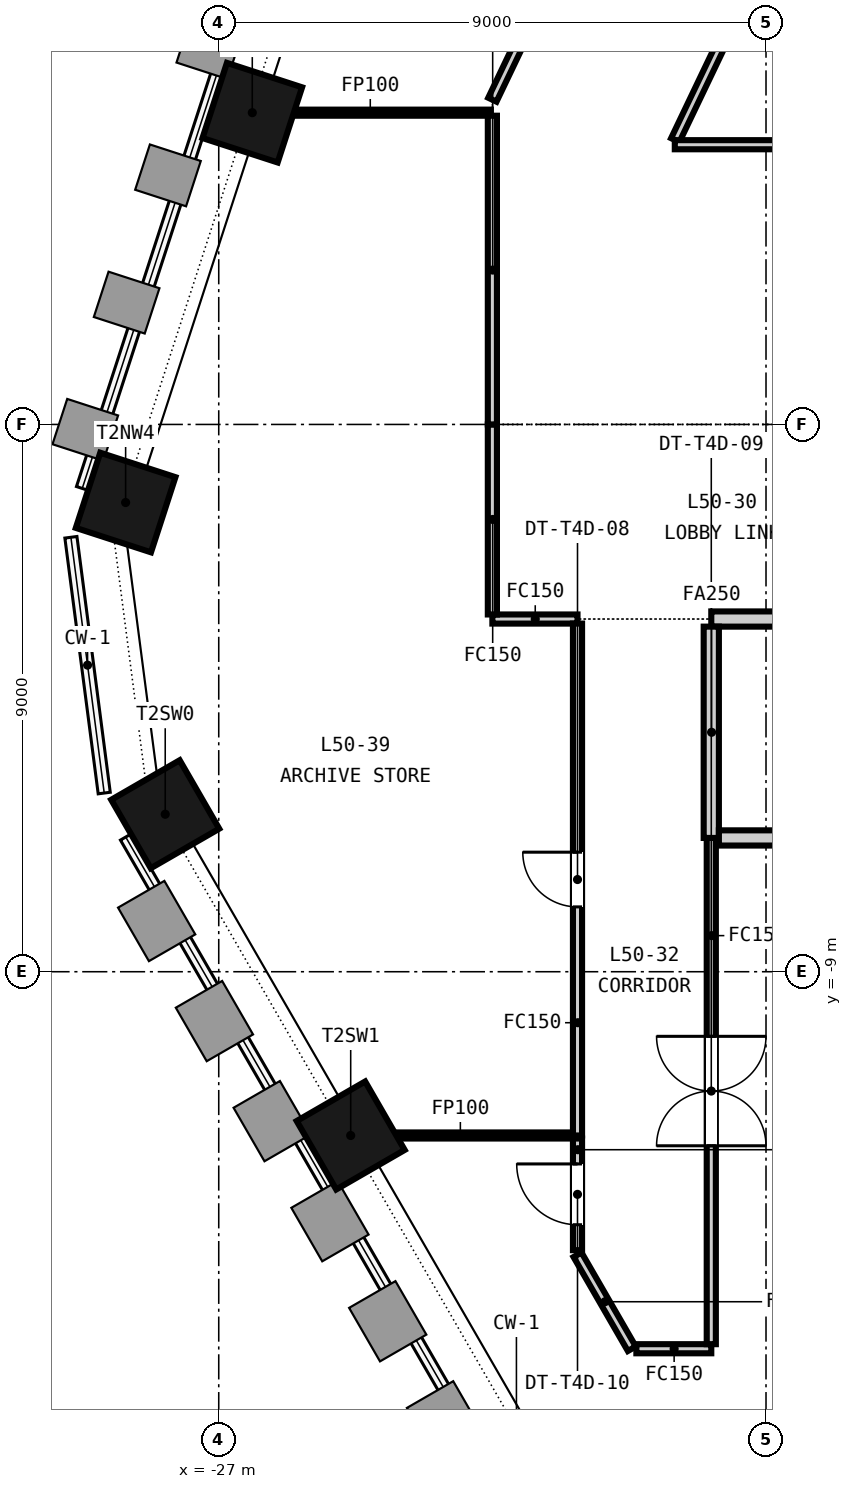
"""IFC4 building model, lengths in metres.
Left out: names, types, materials, properties, quantities, classifications, styles, units other than length and angle.
Written with IfcOpenShell. Run it as: python <this file> out.ifc"""

import sys

from ifc_helpers import new_model, si_unit, direction, frame, frame_2d, origin, origin_2d, place, context, subcontext, project, spatial, rectangle, extrude, element, fill, save


model = new_model("IFC4")
c1 = context("Model", 3, precision=1e-05, world=origin(), true_north=direction((0.0, 1.0)))
c2 = subcontext(c1, "Body", "Model", "MODEL_VIEW")
j1 = project(units=[si_unit("LENGTHUNIT", "METRE"), si_unit("PLANEANGLEUNIT", "RADIAN")], contexts=[c1])
p1 = place(None, origin())
s1 = spatial("IfcSite", under=j1, at=p1, CompositionType="ELEMENT")
p2 = place(p1, origin())
s2 = spatial("IfcBuilding", under=s1, at=p2, CompositionType="ELEMENT")
p3 = place(p2, frame((0.0, 0.0, 200.0)))
s3 = spatial("IfcBuildingStorey", under=s2, at=p3, CompositionType="ELEMENT", Elevation=200.0)
for number, where, z_axis, x_axis in (
    (1, (-26.448, 5.127, -0.15), (0.0, 0.0, 1.0), (-0.309, -0.951, 0.0)),
    (2, (-28.531, -1.284, -0.15), (0.0, 0.0, 1.0), (-0.309, -0.951, 0.0)),
    (3, (-27.88, -6.41, -0.15), (0.0, 0.0, 1.0), (0.5, -0.866, 0.0)),
    (4, (-24.83, -11.693, -0.15), (0.0, 0.0, 1.0), (0.5, -0.866, 0.0)),
):
    element("IfcColumn", number, at=place(p3, frame(where, z_axis=z_axis, x_axis=x_axis)), inside=s3, PredefinedType="COLUMN", context=c2, shape_type="SweptSolid", body=[
        extrude(rectangle(XDim=1.3, YDim=1.3, at=origin_2d()), origin(), (0.0, 0.0, 1.0), 3.65),
    ])
p4 = place(p3, frame((-21.1, -3.2, 0.0), z_axis=(0.0, 0.0, 1.0), x_axis=(-1.0, 0.0, 0.0)))
e5 = element("IfcWall", 5, at=p4, inside=s3, PredefinedType="PARTITIONING", context=c2, shape_type="SweptSolid", body=[
    extrude(rectangle(XDim=1.4, YDim=0.15, at=frame_2d((0.7, 0.0))), origin(), (0.0, 0.0, 1.0), 2.741),
])
p5 = place(p3, frame((-15.0, -3.2, 0.0), z_axis=(0.0, 0.0, 1.0), x_axis=(-1.0, 0.0, 0.0)))
e6 = element("IfcWall", 6, at=p5, inside=s3, PredefinedType="PARTITIONING", context=c2, shape_type="SweptSolid", body=[
    extrude(rectangle(XDim=3.9, YDim=0.25, at=frame_2d((1.95, 0.0))), origin(), (0.0, 0.0, 1.0), 2.741),
])
p6 = place(p3, frame((-15.0, 14.069, 0.0), z_axis=(0.0, 0.0, 1.0), x_axis=(-0.43146462293, -0.902129857149, 0.0)))
e7 = element("IfcWall", 7, at=p6, inside=s3, PredefinedType="PARTITIONING", context=c2, shape_type="SweptSolid", body=[
    extrude(rectangle(XDim=10.413, YDim=0.15, at=frame_2d((5.207, 0.0))), origin(), (0.0, 0.0, 1.0), 2.741),
])
p7 = place(p6, frame((4.715, 0.0, 0.0)))
e8 = element("IfcOpeningElement", 8, at=p7, cuts=e7, PredefinedType="OPENING", context=c2, shape_type="SweptSolid", body=[
    extrude(rectangle(XDim=1.0, YDim=2.1, at=frame_2d((0.5, 1.05))), frame((0.0, 0.085, 0.0), z_axis=(0.0, -1.0, 0.0), x_axis=(1.0, 0.0, 0.0)), (0.0, 0.0, 1.0), 0.17),
])
p8 = place(p3, frame((-20.207, -15.2, 0.0), z_axis=(0.0, 0.0, 1.0), x_axis=(-0.500227474337, 0.865894031576, 0.0)))
e9 = element("IfcWall", 9, at=p8, inside=s3, PredefinedType="PARTITIONING", context=c2, shape_type="SweptSolid", body=[
    extrude(rectangle(XDim=1.785, YDim=0.15, at=frame_2d((0.893, 0.0))), origin(), (0.0, 0.0, 1.0), 2.741),
])
p9 = place(p3, frame((-18.9, -15.2, 0.0), z_axis=(0.0, 0.0, 1.0), x_axis=(-1.0, 0.0, 0.0)))
e10 = element("IfcWall", 10, at=p9, inside=s3, PredefinedType="PARTITIONING", context=c2, shape_type="SweptSolid", body=[
    extrude(rectangle(XDim=1.232, YDim=0.15, at=frame_2d((0.616, 0.0))), origin(), (0.0, 0.0, 1.0), 2.741),
])
p10 = place(p3, frame((-18.9, -6.8, 0.0), z_axis=(0.0, 0.0, 1.0), x_axis=(0.0, -1.0, 0.0)))
e11 = element("IfcWall", 11, at=p10, inside=s3, PredefinedType="PARTITIONING", context=c2, shape_type="SweptSolid", body=[
    extrude(rectangle(XDim=8.325, YDim=0.15, at=frame_2d((4.163, 0.0))), origin(), (0.0, 0.0, 1.0), 2.741),
])
p11 = place(p10, frame((3.262, 0.0, 0.0)))
e12 = element("IfcOpeningElement", 12, at=p11, cuts=e11, PredefinedType="OPENING", context=c2, shape_type="SweptSolid", body=[
    extrude(rectangle(XDim=1.8, YDim=2.1, at=frame_2d((0.9, 1.05))), frame((0.0, 0.085, 0.0), z_axis=(0.0, -1.0, 0.0), x_axis=(1.0, 0.0, 0.0)), (0.0, 0.0, 1.0), 0.17),
])
p12 = place(p3, frame((-18.9, -3.325, 0.0), z_axis=(0.0, 0.0, 1.0), x_axis=(0.0, -1.0, 0.0)))
e13 = element("IfcWall", 13, at=p12, inside=s3, PredefinedType="PARTITIONING", context=c2, shape_type="SweptSolid", body=[
    extrude(rectangle(XDim=3.475, YDim=0.25, at=frame_2d((1.738, 0.0))), origin(), (0.0, 0.0, 1.0), 2.741),
])
p13 = place(p3, frame((-22.5, 5.34, 0.0), z_axis=(0.0, 0.0, 1.0), x_axis=(0.431478749841, 0.902123100489, 0.0)))
e14 = element("IfcWall", 14, at=p13, inside=s3, PredefinedType="PARTITIONING", context=c2, shape_type="SweptSolid", body=[
    extrude(rectangle(XDim=7.43, YDim=0.15, at=frame_2d((3.715, 0.0))), origin(), (0.0, 0.0, 1.0), 2.741),
])
p14 = place(p13, frame((3.215, 0.0, 0.0)))
e15 = element("IfcOpeningElement", 15, at=p14, cuts=e14, PredefinedType="OPENING", context=c2, shape_type="SweptSolid", body=[
    extrude(rectangle(XDim=1.0, YDim=2.1, at=frame_2d((0.5, 1.05))), frame((0.0, 0.085, 0.0), z_axis=(0.0, -1.0, 0.0), x_axis=(1.0, 0.0, 0.0)), (0.0, 0.0, 1.0), 0.17),
])
p15 = place(p3, frame((-26.501, 5.127, 0.0), z_axis=(0.0, 0.0, 1.0), x_axis=(1.0, 0.0, 0.0)))
e16 = element("IfcWall", 16, at=p15, inside=s3, PredefinedType="PARTITIONING", context=c2, shape_type="SweptSolid", body=[
    extrude(rectangle(XDim=3.976, YDim=0.1, at=frame_2d((1.988, 0.0))), origin(), (0.0, 0.0, 1.0), 2.741),
])
p16 = place(p3, frame((-19.5, 4.6, 0.0), z_axis=(0.0, 0.0, 1.0), x_axis=(1.0, 0.0, 0.0)))
e17 = element("IfcWall", 17, at=p16, inside=s3, PredefinedType="PARTITIONING", context=c2, shape_type="SweptSolid", body=[
    extrude(rectangle(XDim=4.5, YDim=0.15, at=frame_2d((2.25, 0.0))), origin(), (0.0, 0.0, 1.0), 2.741),
])
p17 = place(p3, frame((-22.5, -3.125, 0.0), z_axis=(0.0, 0.0, 1.0), x_axis=(0.0, 1.0, 0.0)))
e18 = element("IfcWall", 18, at=p17, inside=s3, PredefinedType="PARTITIONING", context=c2, shape_type="SweptSolid", body=[
    extrude(rectangle(XDim=3.125, YDim=0.15, at=frame_2d((1.562, 0.0))), origin(), (0.0, 0.0, 1.0), 2.741),
])
p18 = place(p3, frame((-22.5, 0.0, 0.0), z_axis=(0.0, 0.0, 1.0), x_axis=(0.0, 1.0, 0.0)))
e19 = element("IfcWall", 19, at=p18, inside=s3, PredefinedType="PARTITIONING", context=c2, shape_type="SweptSolid", body=[
    extrude(rectangle(XDim=5.077, YDim=0.15, at=frame_2d((2.539, 0.0))), origin(), (0.0, 0.0, 1.0), 2.741),
])
p19 = place(p3, frame((-21.1, -11.693, 0.0), z_axis=(0.0, 0.0, 1.0), x_axis=(0.0, 1.0, 0.0)))
e20 = element("IfcWall", 20, at=p19, inside=s3, PredefinedType="PARTITIONING", context=c2, shape_type="SweptSolid", body=[
    extrude(rectangle(XDim=8.418, YDim=0.15, at=frame_2d((4.209, 0.0))), origin(), (0.0, 0.0, 1.0), 2.741),
])
p20 = place(p19, frame((3.759, 0.0, 0.0)))
e21 = element("IfcOpeningElement", 21, at=p20, cuts=e20, PredefinedType="OPENING", context=c2, shape_type="SweptSolid", body=[
    extrude(rectangle(XDim=0.9, YDim=2.1, at=frame_2d((0.45, 1.05))), frame((0.0, 0.085, 0.0), z_axis=(0.0, -1.0, 0.0), x_axis=(1.0, 0.0, 0.0)), (0.0, 0.0, 1.0), 0.17),
])
p21 = place(p3, frame((-24.888, -11.693, 0.0), z_axis=(0.0, 0.0, 1.0), x_axis=(1.0, 0.0, 0.0)))
e22 = element("IfcWall", 22, at=p21, inside=s3, PredefinedType="PARTITIONING", context=c2, shape_type="SweptSolid", body=[
    extrude(rectangle(XDim=3.713, YDim=0.1, at=frame_2d((1.856, 0.0))), origin(), (0.0, 0.0, 1.0), 2.741),
])
p22 = place(p3, frame((-21.1, -13.579, 0.0), z_axis=(0.0, 0.0, 1.0), x_axis=(0.0, 1.0, 0.0)))
e23 = element("IfcWall", 23, at=p22, inside=s3, PredefinedType="PARTITIONING", context=c2, shape_type="SweptSolid", body=[
    extrude(rectangle(XDim=1.836, YDim=0.15, at=frame_2d((0.918, 0.0))), origin(), (0.0, 0.0, 1.0), 2.741),
])
p23 = place(p22, frame((0.418, 0.0, 0.0)))
e24 = element("IfcOpeningElement", 24, at=p23, cuts=e23, PredefinedType="OPENING", context=c2, shape_type="SweptSolid", body=[
    extrude(rectangle(XDim=1.0, YDim=2.1, at=frame_2d((0.5, 1.05))), frame((0.0, 0.085, 0.0), z_axis=(0.0, -1.0, 0.0), x_axis=(1.0, 0.0, 0.0)), (0.0, 0.0, 1.0), 0.17),
])
p24 = place(p3, frame((-18.775, -6.8, 0.0), z_axis=(0.0, 0.0, 1.0), x_axis=(1.0, 0.0, 0.0)))
e25 = element("IfcWall", 25, at=p24, inside=s3, PredefinedType="PARTITIONING", context=c2, shape_type="SweptSolid", body=[
    extrude(rectangle(XDim=26.295, YDim=0.25, at=frame_2d((13.147, 0.0))), origin(), (0.0, 0.0, 1.0), 2.741),
])
p25 = place(p20, origin())
e26 = element("IfcDoor", 26, at=p25, inside=s3, OperationType="SINGLE_SWING_RIGHT", PredefinedType="DOOR", context=c2, shape_type="SweptSolid", body=[
    extrude(rectangle(XDim=0.9, YDim=2.1, at=frame_2d((0.45, 1.05))), frame((0.0, 0.025, 0.0), z_axis=(0.0, -1.0, 0.0), x_axis=(1.0, 0.0, 0.0)), (0.0, 0.0, 1.0), 0.05),
])
fill(e21, e26)
p26 = place(p11, origin())
e27 = element("IfcDoor", 27, at=p26, inside=s3, OperationType="DOUBLE_DOOR_DOUBLE_SWING", PredefinedType="DOOR", context=c2, shape_type="SweptSolid", body=[
    extrude(rectangle(XDim=1.8, YDim=2.1, at=frame_2d((0.9, 1.05))), frame((0.0, 0.025, 0.0), z_axis=(0.0, -1.0, 0.0), x_axis=(1.0, 0.0, 0.0)), (0.0, 0.0, 1.0), 0.05),
])
fill(e12, e27)
p27 = place(p23, origin())
e28 = element("IfcDoor", 28, at=p27, inside=s3, OperationType="SINGLE_SWING_RIGHT", PredefinedType="DOOR", context=c2, shape_type="SweptSolid", body=[
    extrude(rectangle(XDim=1.0, YDim=2.1, at=frame_2d((0.5, 1.05))), frame((0.0, 0.025, 0.0), z_axis=(0.0, -1.0, 0.0), x_axis=(1.0, 0.0, 0.0)), (0.0, 0.0, 1.0), 0.05),
])
fill(e24, e28)
save(model, sys.argv[1])
